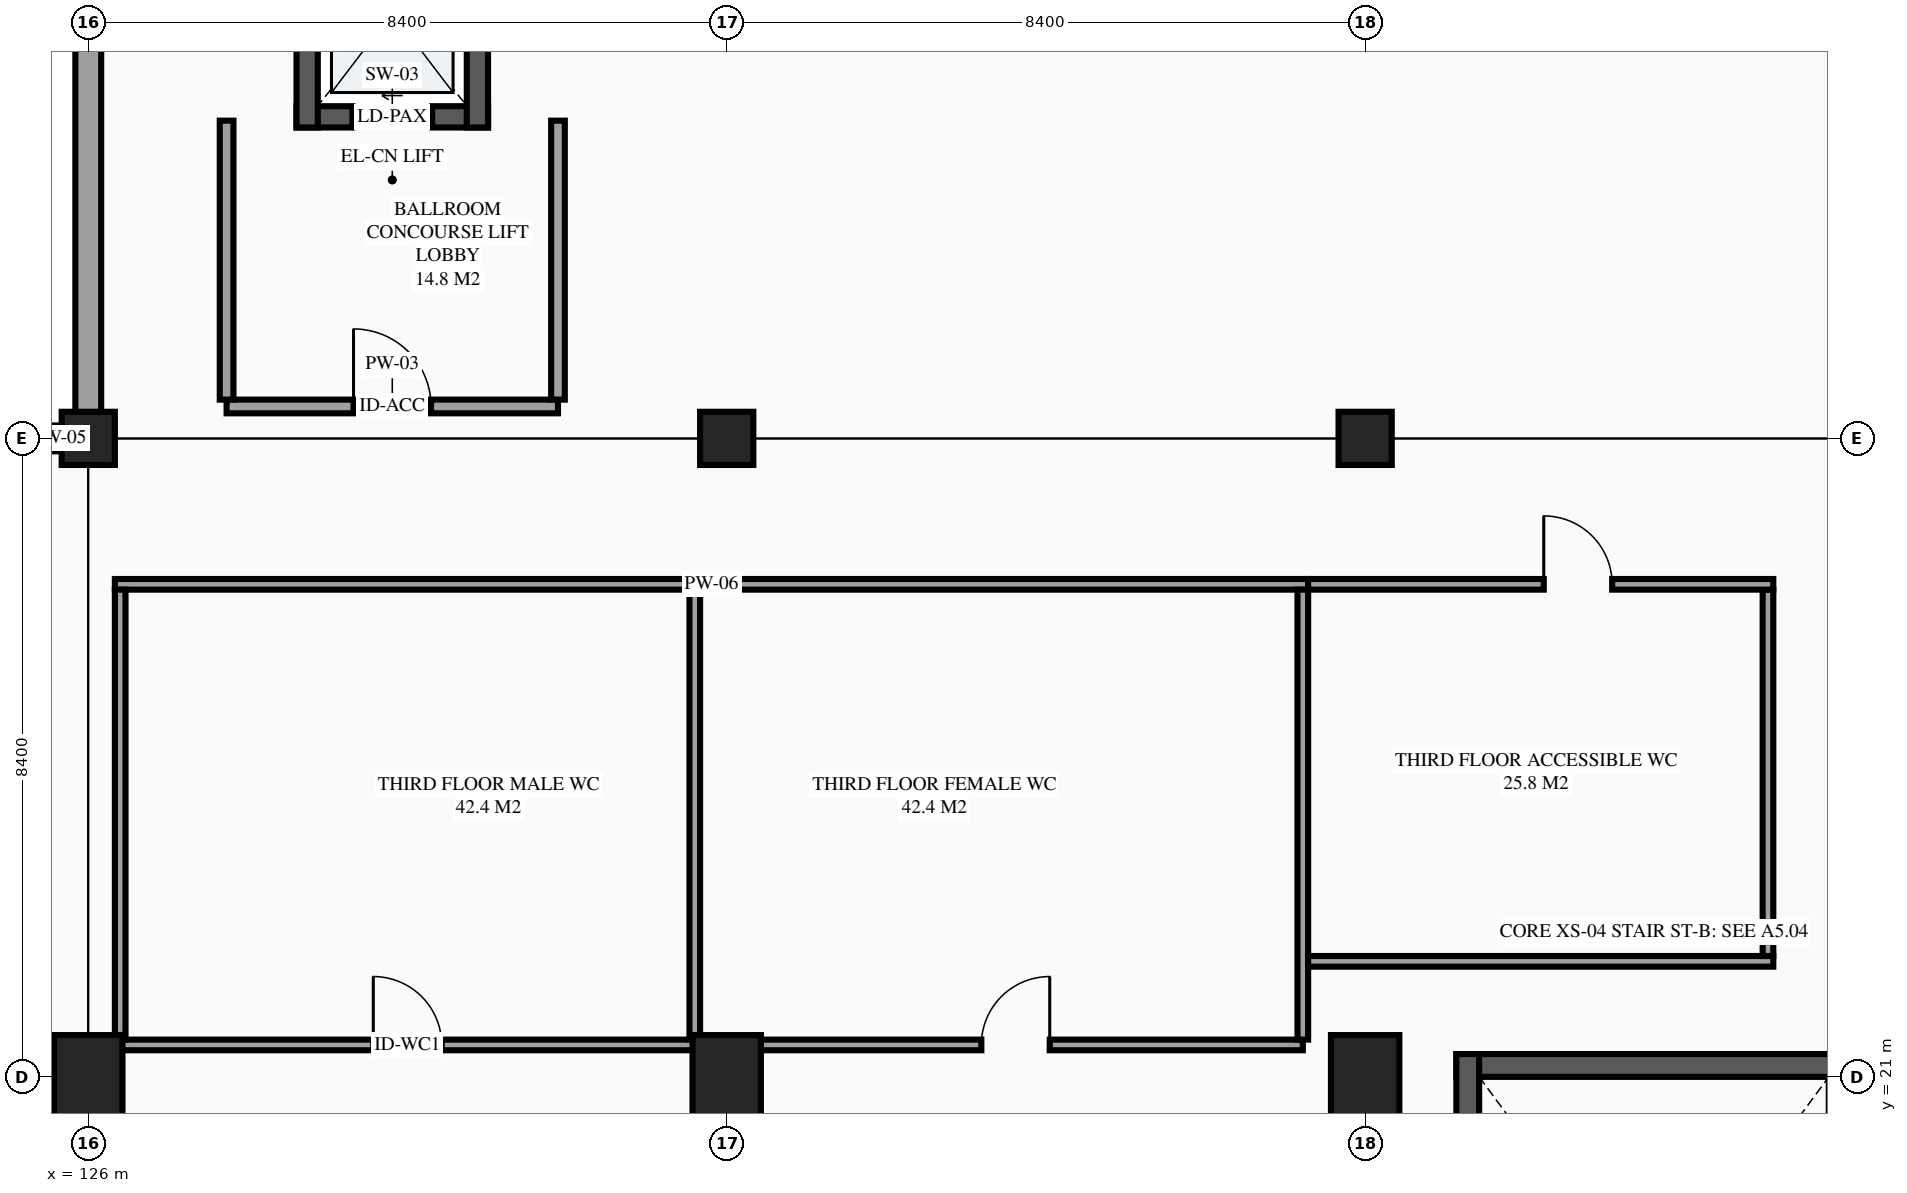
"""IFC4 building model, lengths in metres.
Left out: names, types, materials, properties, quantities, classifications, styles, units other than length and angle.
Written with IfcOpenShell. Run it as: python <this file> out.ifc"""

import sys

from ifc_helpers import new_model, si_unit, direction, frame, frame_2d, origin, origin_2d, place, context, subcontext, project, spatial, rectangle, extrude, element, fill, save


model = new_model("IFC4")
c1 = context("Model", 3, precision=1e-05, world=origin(), true_north=direction((0.0, 1.0)))
c2 = subcontext(c1, "Body", "Model", "MODEL_VIEW")
j1 = project(units=[si_unit("LENGTHUNIT", "METRE"), si_unit("PLANEANGLEUNIT", "RADIAN")], contexts=[c1])
p1 = place(None, origin())
s1 = spatial("IfcSite", under=j1, at=p1, CompositionType="ELEMENT")
p2 = place(p1, origin())
s2 = spatial("IfcBuilding", under=s1, at=p2, CompositionType="ELEMENT")
p3 = place(p2, frame((0.0, 0.0, 14.1)))
s3 = spatial("IfcBuildingStorey", under=s2, at=p3, CompositionType="ELEMENT", Elevation=14.1)
p4 = place(p3, frame((126.0, 21.0, 0.0), z_axis=(0.0, 0.0, 1.0), x_axis=(1.0, 0.0, 0.0)))
e1 = element("IfcColumn", 1, at=p4, inside=s3, PredefinedType="COLUMN", context=c2, shape_type="SweptSolid", body=[
    extrude(rectangle(XDim=0.9, YDim=1.1, at=origin_2d()), origin(), (0.0, 0.0, 1.0), 4.2),
])
p5 = place(p3, frame((126.0, 29.4, 0.0), z_axis=(0.0, 0.0, 1.0), x_axis=(1.0, 0.0, 0.0)))
e2 = element("IfcColumn", 2, at=p5, inside=s3, PredefinedType="COLUMN", context=c2, shape_type="SweptSolid", body=[
    extrude(rectangle(XDim=0.7, YDim=0.7, at=origin_2d()), origin(), (0.0, 0.0, 1.0), 4.2),
])
p6 = place(p3, frame((134.4, 21.0, 0.0), z_axis=(0.0, 0.0, 1.0), x_axis=(1.0, 0.0, 0.0)))
e3 = element("IfcColumn", 3, at=p6, inside=s3, PredefinedType="COLUMN", context=c2, shape_type="SweptSolid", body=[
    extrude(rectangle(XDim=0.9, YDim=1.1, at=origin_2d()), origin(), (0.0, 0.0, 1.0), 4.2),
])
p7 = place(p3, frame((134.4, 29.4, 0.0), z_axis=(0.0, 0.0, 1.0), x_axis=(1.0, 0.0, 0.0)))
e4 = element("IfcColumn", 4, at=p7, inside=s3, PredefinedType="COLUMN", context=c2, shape_type="SweptSolid", body=[
    extrude(rectangle(XDim=0.7, YDim=0.7, at=origin_2d()), origin(), (0.0, 0.0, 1.0), 4.2),
])
p8 = place(p3, frame((142.8, 21.0, 0.0), z_axis=(0.0, 0.0, 1.0), x_axis=(1.0, 0.0, 0.0)))
e5 = element("IfcColumn", 5, at=p8, inside=s3, PredefinedType="COLUMN", context=c2, shape_type="SweptSolid", body=[
    extrude(rectangle(XDim=0.9, YDim=1.1, at=origin_2d()), origin(), (0.0, 0.0, 1.0), 4.2),
])
p9 = place(p3, frame((142.8, 29.4, 0.0), z_axis=(0.0, 0.0, 1.0), x_axis=(1.0, 0.0, 0.0)))
e6 = element("IfcColumn", 6, at=p9, inside=s3, PredefinedType="COLUMN", context=c2, shape_type="SweptSolid", body=[
    extrude(rectangle(XDim=0.7, YDim=0.7, at=origin_2d()), origin(), (0.0, 0.0, 1.0), 4.2),
])
p10 = place(p3, frame((125.83, 29.4, 0.0), z_axis=(0.0, 0.0, 1.0), x_axis=(-1.0, 0.0, 0.0)))
e7 = element("IfcWall", 7, at=p10, inside=s3, PredefinedType="STANDARD", context=c2, shape_type="SweptSolid", body=[
    extrude(rectangle(XDim=0.43, YDim=0.34, at=frame_2d((0.215, 0.0))), origin(), (0.0, 0.0, 1.0), 4.2),
])
p11 = place(p3, frame((126.0, 37.8, 0.0), z_axis=(0.0, 0.0, 1.0), x_axis=(0.0, -1.0, 0.0)))
e8 = element("IfcWall", 8, at=p11, inside=s3, PredefinedType="STANDARD", context=c2, shape_type="SweptSolid", body=[
    extrude(rectangle(XDim=8.4, YDim=0.34, at=frame_2d((4.2, 0.0))), origin(), (0.0, 0.0, 1.0), 3.05),
])
p12 = place(p3, frame((128.74, 33.63, 0.0), z_axis=(0.0, 0.0, 1.0), x_axis=(1.0, 0.0, 0.0)))
e9 = element("IfcWall", 9, at=p12, inside=s3, PredefinedType="SHEAR", context=c2, shape_type="SweptSolid", body=[
    extrude(rectangle(XDim=2.52, YDim=0.28, at=frame_2d((1.26, 0.0))), origin(), (0.0, 0.0, 1.0), 4.2),
])
p13 = place(p12, frame((0.735, 0.0, 0.0)))
e10 = element("IfcOpeningElement", 10, at=p13, cuts=e9, PredefinedType="OPENING", context=c2, shape_type="SweptSolid", body=[
    extrude(rectangle(XDim=1.05, YDim=2.2, at=frame_2d((0.525, 1.1))), frame((0.0, 0.15, 0.0), z_axis=(0.0, -1.0, 0.0), x_axis=(1.0, 0.0, 0.0)), (0.0, 0.0, 1.0), 0.3),
])
for number, where, z_axis, x_axis in (
    (11, (131.12, 33.49, 0.0), (0.0, 0.0, 1.0), (0.0, 1.0, 0.0)),
    (12, (128.88, 36.51, 0.0), (0.0, 0.0, 1.0), (0.0, -1.0, 0.0)),
):
    element("IfcWall", number, at=place(p3, frame(where, z_axis=z_axis, x_axis=x_axis)), inside=s3, PredefinedType="SHEAR", context=c2, shape_type="SweptSolid", body=[
        extrude(rectangle(XDim=3.02, YDim=0.28, at=frame_2d((1.51, 0.0))), origin(), (0.0, 0.0, 1.0), 4.2),
    ])
p14 = place(p3, frame((149.2, 21.15, 0.0), z_axis=(0.0, 0.0, 1.0), x_axis=(-1.0, 0.0, 0.0)))
e13 = element("IfcWall", 13, at=p14, inside=s3, PredefinedType="SHEAR", context=c2, shape_type="SweptSolid", body=[
    extrude(rectangle(XDim=5.2, YDim=0.3, at=frame_2d((2.6, 0.0))), origin(), (0.0, 0.0, 1.0), 4.2),
])
p15 = place(p3, frame((144.15, 21.3, 0.0), z_axis=(0.0, 0.0, 1.0), x_axis=(0.0, -1.0, 0.0)))
e14 = element("IfcWall", 14, at=p15, inside=s3, PredefinedType="SHEAR", context=c2, shape_type="SweptSolid", body=[
    extrude(rectangle(XDim=8.84, YDim=0.3, at=frame_2d((4.42, 0.0))), origin(), (0.0, 0.0, 1.0), 4.2),
])
p16 = place(p3, frame((126.35, 27.48, 0.0), z_axis=(0.0, 0.0, 1.0), x_axis=(1.0, 0.0, 0.0)))
e15 = element("IfcWall", 15, at=p16, inside=s3, PredefinedType="PARTITIONING", context=c2, shape_type="SweptSolid", body=[
    extrude(rectangle(XDim=15.7, YDim=0.14, at=frame_2d((7.85, 0.0))), origin(), (0.0, 0.0, 1.0), 3.895),
])
p17 = place(p3, frame((127.82, 29.82, 0.0), z_axis=(0.0, 0.0, 1.0), x_axis=(1.0, 0.0, 0.0)))
e16 = element("IfcWall", 16, at=p17, inside=s3, PredefinedType="PARTITIONING", context=c2, shape_type="SweptSolid", body=[
    extrude(rectangle(XDim=4.36, YDim=0.18, at=frame_2d((2.18, 0.0))), origin(), (0.0, 0.0, 1.0), 3.895),
])
p18 = place(p17, frame((1.67, 0.0, 0.0)))
e17 = element("IfcOpeningElement", 17, at=p18, cuts=e16, PredefinedType="OPENING", context=c2, shape_type="SweptSolid", body=[
    extrude(rectangle(XDim=1.02, YDim=2.15, at=frame_2d((0.51, 1.075))), frame((0.0, 0.1, 0.0), z_axis=(0.0, -1.0, 0.0), x_axis=(1.0, 0.0, 0.0)), (0.0, 0.0, 1.0), 0.2),
])
for number, where, z_axis, x_axis in (
    (18, (127.82, 29.91, 0.0), (0.0, 0.0, 1.0), (0.0, 1.0, 0.0)),
    (19, (132.18, 29.91, 0.0), (0.0, 0.0, 1.0), (0.0, 1.0, 0.0)),
):
    element("IfcWall", number, at=place(p3, frame(where, z_axis=z_axis, x_axis=x_axis)), inside=s3, PredefinedType="PARTITIONING", context=c2, shape_type="SweptSolid", body=[
        extrude(rectangle(XDim=3.67, YDim=0.18, at=frame_2d((1.835, 0.0))), origin(), (0.0, 0.0, 1.0), 3.895),
    ])
p19 = place(p3, frame((126.42, 21.42, 0.0), z_axis=(0.0, 0.0, 1.0), x_axis=(1.0, 0.0, 0.0)))
e20 = element("IfcWall", 20, at=p19, inside=s3, PredefinedType="PARTITIONING", context=c2, shape_type="SweptSolid", body=[
    extrude(rectangle(XDim=7.56, YDim=0.14, at=frame_2d((3.78, 0.0))), origin(), (0.0, 0.0, 1.0), 3.895),
])
p20 = place(p19, frame((3.33, 0.0, 0.0)))
e21 = element("IfcOpeningElement", 21, at=p20, cuts=e20, PredefinedType="OPENING", context=c2, shape_type="SweptSolid", body=[
    extrude(rectangle(XDim=0.9, YDim=2.12, at=frame_2d((0.45, 1.06))), frame((0.0, 0.08, 0.0), z_axis=(0.0, -1.0, 0.0), x_axis=(1.0, 0.0, 0.0)), (0.0, 0.0, 1.0), 0.16),
])
for number, where, z_axis, x_axis in (
    (22, (126.42, 21.49, 0.0), (0.0, 0.0, 1.0), (0.0, 1.0, 0.0)),
    (23, (133.98, 21.49, 0.0), (0.0, 0.0, 1.0), (0.0, 1.0, 0.0)),
):
    element("IfcWall", number, at=place(p3, frame(where, z_axis=z_axis, x_axis=x_axis)), inside=s3, PredefinedType="PARTITIONING", context=c2, shape_type="SweptSolid", body=[
        extrude(rectangle(XDim=5.92, YDim=0.14, at=frame_2d((2.96, 0.0))), origin(), (0.0, 0.0, 1.0), 3.895),
    ])
p21 = place(p3, frame((134.42, 21.42, 0.0), z_axis=(0.0, 0.0, 1.0), x_axis=(1.0, 0.0, 0.0)))
e24 = element("IfcWall", 24, at=p21, inside=s3, PredefinedType="PARTITIONING", context=c2, shape_type="SweptSolid", body=[
    extrude(rectangle(XDim=7.56, YDim=0.14, at=frame_2d((3.78, 0.0))), origin(), (0.0, 0.0, 1.0), 3.895),
])
p22 = place(p21, frame((3.33, 0.0, 0.0)))
e25 = element("IfcOpeningElement", 25, at=p22, cuts=e24, PredefinedType="OPENING", context=c2, shape_type="SweptSolid", body=[
    extrude(rectangle(XDim=0.9, YDim=2.12, at=frame_2d((0.45, 1.06))), frame((0.0, 0.08, 0.0), z_axis=(0.0, -1.0, 0.0), x_axis=(1.0, 0.0, 0.0)), (0.0, 0.0, 1.0), 0.16),
])
p23 = place(p3, frame((141.98, 21.49, 0.0), z_axis=(0.0, 0.0, 1.0), x_axis=(0.0, 1.0, 0.0)))
e26 = element("IfcWall", 26, at=p23, inside=s3, PredefinedType="PARTITIONING", context=c2, shape_type="SweptSolid", body=[
    extrude(rectangle(XDim=5.92, YDim=0.14, at=frame_2d((2.96, 0.0))), origin(), (0.0, 0.0, 1.0), 3.895),
])
p24 = place(p3, frame((142.05, 22.52, 0.0), z_axis=(0.0, 0.0, 1.0), x_axis=(1.0, 0.0, 0.0)))
e27 = element("IfcWall", 27, at=p24, inside=s3, PredefinedType="PARTITIONING", context=c2, shape_type="SweptSolid", body=[
    extrude(rectangle(XDim=6.12, YDim=0.14, at=frame_2d((3.06, 0.0))), origin(), (0.0, 0.0, 1.0), 3.895),
])
p25 = place(p3, frame((148.1, 22.59, 0.0), z_axis=(0.0, 0.0, 1.0), x_axis=(0.0, 1.0, 0.0)))
e28 = element("IfcWall", 28, at=p25, inside=s3, PredefinedType="PARTITIONING", context=c2, shape_type="SweptSolid", body=[
    extrude(rectangle(XDim=4.82, YDim=0.14, at=frame_2d((2.41, 0.0))), origin(), (0.0, 0.0, 1.0), 3.895),
])
p26 = place(p3, frame((142.05, 27.48, 0.0), z_axis=(0.0, 0.0, 1.0), x_axis=(1.0, 0.0, 0.0)))
e29 = element("IfcWall", 29, at=p26, inside=s3, PredefinedType="PARTITIONING", context=c2, shape_type="SweptSolid", body=[
    extrude(rectangle(XDim=6.12, YDim=0.14, at=frame_2d((3.06, 0.0))), origin(), (0.0, 0.0, 1.0), 3.895),
])
p27 = place(p26, frame((3.1, 0.0, 0.0)))
e30 = element("IfcOpeningElement", 30, at=p27, cuts=e29, PredefinedType="OPENING", context=c2, shape_type="SweptSolid", body=[
    extrude(rectangle(XDim=0.9, YDim=2.12, at=frame_2d((0.45, 1.06))), frame((0.0, 0.08, 0.0), z_axis=(0.0, -1.0, 0.0), x_axis=(1.0, 0.0, 0.0)), (0.0, 0.0, 1.0), 0.16),
])
p28 = place(p13, origin())
e31 = element("IfcDoor", 31, at=p28, inside=s3, OperationType="SLIDING_TO_LEFT", PredefinedType="DOOR", context=c2, shape_type="SweptSolid", body=[
    extrude(rectangle(XDim=1.05, YDim=2.2, at=frame_2d((0.525, 1.1))), frame((0.0, 0.025, 0.0), z_axis=(0.0, -1.0, 0.0), x_axis=(1.0, 0.0, 0.0)), (0.0, 0.0, 1.0), 0.05),
])
fill(e10, e31)
p29 = place(p18, origin())
e32 = element("IfcDoor", 32, at=p29, inside=s3, OperationType="SINGLE_SWING_LEFT", PredefinedType="DOOR", context=c2, shape_type="SweptSolid", body=[
    extrude(rectangle(XDim=1.02, YDim=2.15, at=frame_2d((0.51, 1.075))), frame((0.0, 0.025, 0.0), z_axis=(0.0, -1.0, 0.0), x_axis=(1.0, 0.0, 0.0)), (0.0, 0.0, 1.0), 0.05),
])
fill(e17, e32)
p30 = place(p20, origin())
e33 = element("IfcDoor", 33, at=p30, inside=s3, OperationType="SINGLE_SWING_LEFT", PredefinedType="DOOR", context=c2, shape_type="SweptSolid", body=[
    extrude(rectangle(XDim=0.9, YDim=2.12, at=frame_2d((0.45, 1.06))), frame((0.0, 0.025, 0.0), z_axis=(0.0, -1.0, 0.0), x_axis=(1.0, 0.0, 0.0)), (0.0, 0.0, 1.0), 0.05),
])
fill(e21, e33)
p31 = place(p22, origin())
e34 = element("IfcDoor", 34, at=p31, inside=s3, OperationType="SINGLE_SWING_RIGHT", PredefinedType="DOOR", context=c2, shape_type="SweptSolid", body=[
    extrude(rectangle(XDim=0.9, YDim=2.12, at=frame_2d((0.45, 1.06))), frame((0.0, 0.025, 0.0), z_axis=(0.0, -1.0, 0.0), x_axis=(1.0, 0.0, 0.0)), (0.0, 0.0, 1.0), 0.05),
])
fill(e25, e34)
p32 = place(p27, origin())
e35 = element("IfcDoor", 35, at=p32, inside=s3, OperationType="SINGLE_SWING_LEFT", PredefinedType="DOOR", context=c2, shape_type="SweptSolid", body=[
    extrude(rectangle(XDim=0.9, YDim=2.12, at=frame_2d((0.45, 1.06))), frame((0.0, 0.025, 0.0), z_axis=(0.0, -1.0, 0.0), x_axis=(1.0, 0.0, 0.0)), (0.0, 0.0, 1.0), 0.05),
])
fill(e30, e35)
save(model, sys.argv[1])
